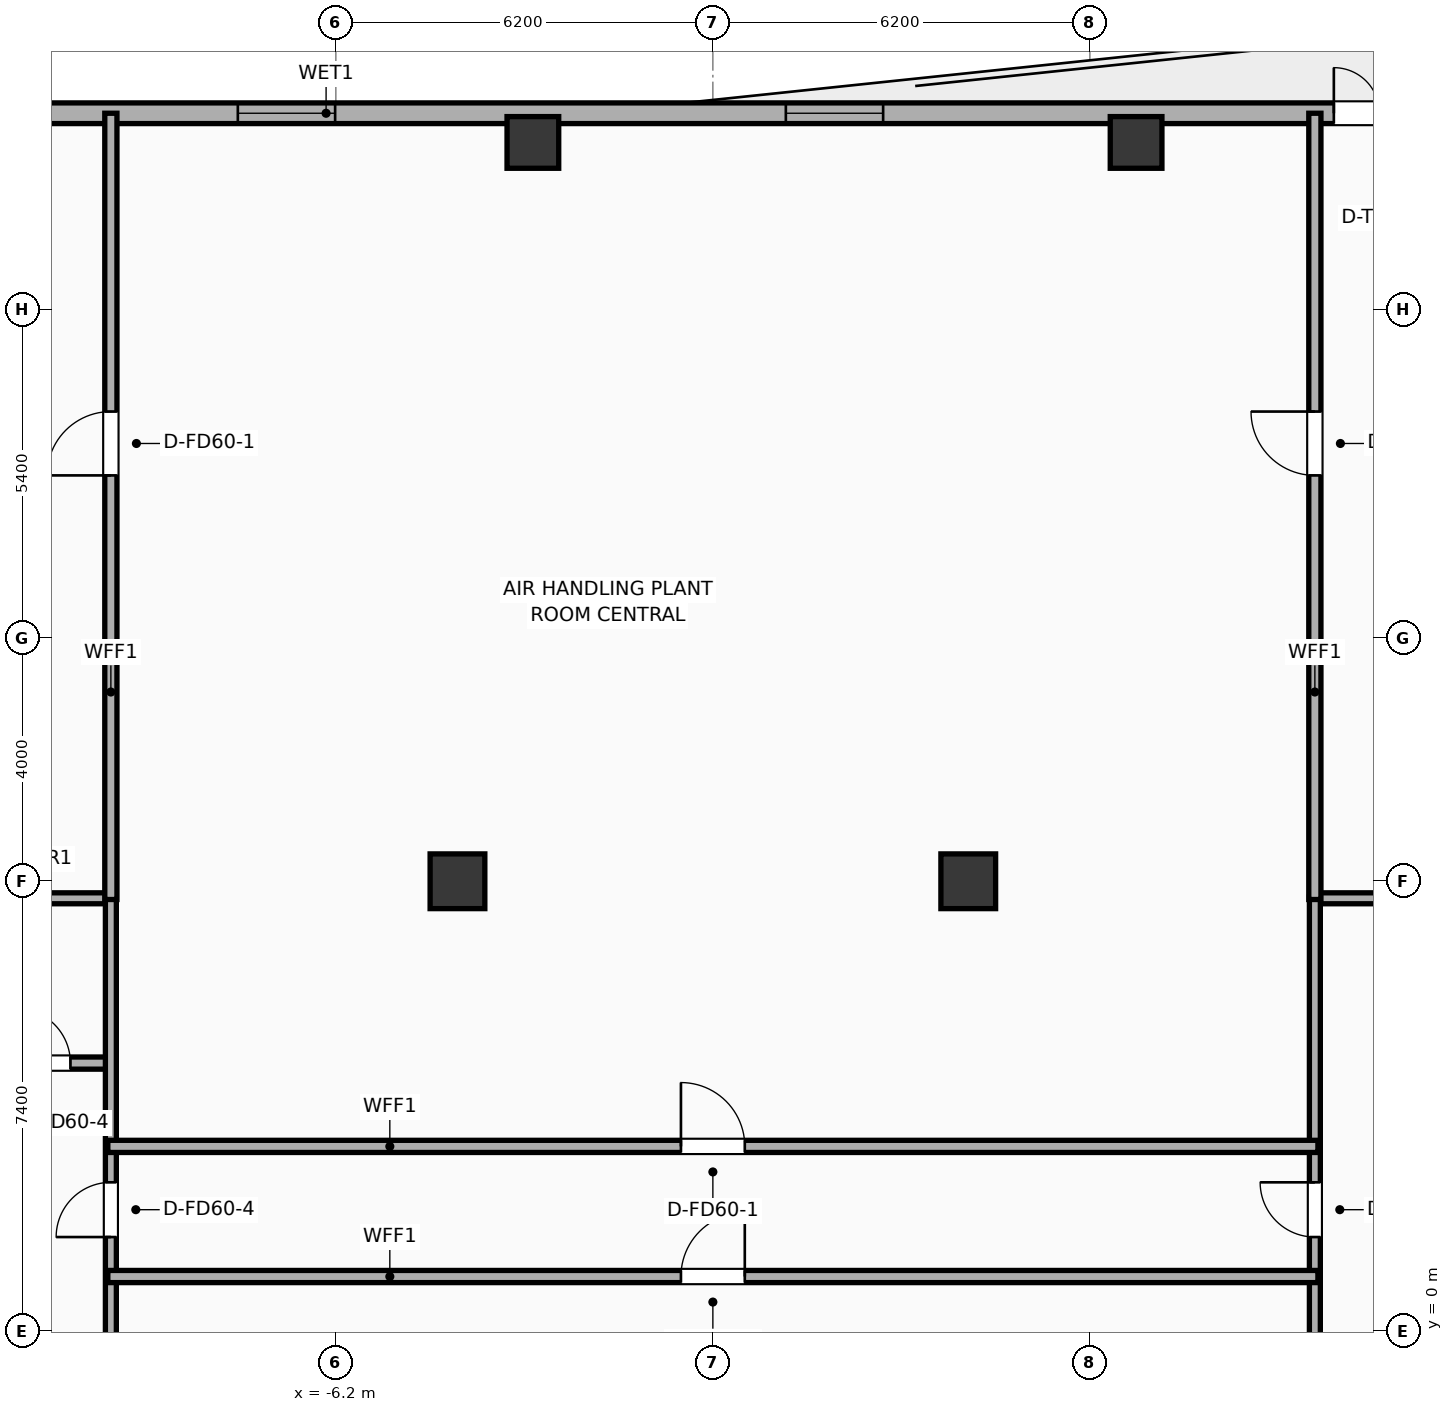
"""IFC4 building model, lengths in metres.
Left out: names, types, materials, properties, quantities, classifications, styles, units other than length and angle.
Written with IfcOpenShell. Run it as: python <this file> out.ifc"""

import sys

from ifc_helpers import new_model, si_unit, direction, frame, frame_2d, origin, origin_2d, place, context, subcontext, project, spatial, rectangle, hollow_rectangle, extrude, element, fill, save


model = new_model("IFC4")
c1 = context("Model", 3, precision=1e-05, world=origin(), true_north=direction((0.0, 1.0)))
c2 = subcontext(c1, "Body", "Model", "MODEL_VIEW")
j1 = project(units=[si_unit("LENGTHUNIT", "METRE"), si_unit("PLANEANGLEUNIT", "RADIAN")], contexts=[c1])
p1 = place(None, origin())
s1 = spatial("IfcSite", under=j1, at=p1, CompositionType="ELEMENT")
p2 = place(p1, origin())
s2 = spatial("IfcBuilding", under=s1, at=p2, CompositionType="ELEMENT")
p3 = place(p2, frame((0.0, 0.0, 195.0)))
s3 = spatial("IfcBuildingStorey", under=s2, at=p3, CompositionType="ELEMENT", Elevation=195.0)
for number, where, z_axis, x_axis in (
    (1, (-4.2, 7.4, 0.0), (0.0, 0.0, 1.0), (1.0, 0.0, 0.0)),
    (2, (4.2, 7.4, 0.0), (0.0, 0.0, 1.0), (1.0, 0.0, 0.0)),
):
    element("IfcColumn", number, at=place(p3, frame(where, z_axis=z_axis, x_axis=x_axis)), inside=s3, PredefinedType="COLUMN", context=c2, shape_type="SweptSolid", body=[
        extrude(rectangle(XDim=0.9, YDim=0.9, at=origin_2d()), origin(), (0.0, 0.0, 1.0), 5.2),
    ])
for number, where, z_axis, x_axis in (
    (3, (6.96, 19.55, -0.4), (0.0, 0.0, 1.0), (1.0, 0.0, 0.0)),
    (4, (-2.96, 19.55, -0.4), (0.0, 0.0, 1.0), (1.0, 0.0, 0.0)),
):
    element("IfcColumn", number, at=place(p3, frame(where, z_axis=z_axis, x_axis=x_axis)), inside=s3, PredefinedType="COLUMN", context=c2, shape_type="SweptSolid", body=[
        extrude(hollow_rectangle(XDim=0.85, YDim=0.85, WallThickness=0.028, at=origin_2d()), origin(), (0.0, 0.0, 1.0), 5.6),
    ])
p4 = place(p3, frame((-22.783, 20.03, 0.0), z_axis=(0.0, 0.0, 1.0), x_axis=(1.0, 0.0, 0.0)))
e5 = element("IfcWall", 5, at=p4, inside=s3, PredefinedType="ELEMENTEDWALL", context=c2, shape_type="SweptSolid", body=[
    extrude(rectangle(XDim=49.566, YDim=0.34, at=frame_2d((24.783, 0.0))), origin(), (0.0, 0.0, 1.0), 3.69),
])
p5 = place(p4, frame((1.453, 0.0, 0.75)))
e6 = element("IfcOpeningElement", 6, at=p5, cuts=e5, PredefinedType="OPENING", context=c2, shape_type="SweptSolid", body=[
    extrude(rectangle(XDim=1.6, YDim=1.4, at=frame_2d((0.8, 0.7))), frame((0.0, 0.18, 0.0), z_axis=(0.0, -1.0, 0.0), x_axis=(1.0, 0.0, 0.0)), (0.0, 0.0, 1.0), 0.36),
])
p6 = place(p4, frame((5.959, 0.0, 0.75)))
e7 = element("IfcOpeningElement", 7, at=p6, cuts=e5, PredefinedType="OPENING", context=c2, shape_type="SweptSolid", body=[
    extrude(rectangle(XDim=1.6, YDim=1.4, at=frame_2d((0.8, 0.7))), frame((0.0, 0.18, 0.0), z_axis=(0.0, -1.0, 0.0), x_axis=(1.0, 0.0, 0.0)), (0.0, 0.0, 1.0), 0.36),
])
p7 = place(p4, frame((14.971, 0.0, 0.75)))
e8 = element("IfcOpeningElement", 8, at=p7, cuts=e5, PredefinedType="OPENING", context=c2, shape_type="SweptSolid", body=[
    extrude(rectangle(XDim=1.6, YDim=1.4, at=frame_2d((0.8, 0.7))), frame((0.0, 0.18, 0.0), z_axis=(0.0, -1.0, 0.0), x_axis=(1.0, 0.0, 0.0)), (0.0, 0.0, 1.0), 0.36),
])
p8 = place(p4, frame((23.983, 0.0, 0.75)))
e9 = element("IfcOpeningElement", 9, at=p8, cuts=e5, PredefinedType="OPENING", context=c2, shape_type="SweptSolid", body=[
    extrude(rectangle(XDim=1.6, YDim=1.4, at=frame_2d((0.8, 0.7))), frame((0.0, 0.18, 0.0), z_axis=(0.0, -1.0, 0.0), x_axis=(1.0, 0.0, 0.0)), (0.0, 0.0, 1.0), 0.36),
])
p9 = place(p4, frame((32.995, 0.0, 0.0)))
e10 = element("IfcOpeningElement", 10, at=p9, cuts=e5, PredefinedType="OPENING", context=c2, shape_type="SweptSolid", body=[
    extrude(rectangle(XDim=1.5, YDim=2.05, at=frame_2d((0.75, 1.025))), frame((0.0, 0.18, 0.0), z_axis=(0.0, -1.0, 0.0), x_axis=(1.0, 0.0, 0.0)), (0.0, 0.0, 1.0), 0.36),
])
p10 = place(p4, frame((42.008, 0.0, 0.75)))
e11 = element("IfcOpeningElement", 11, at=p10, cuts=e5, PredefinedType="OPENING", context=c2, shape_type="SweptSolid", body=[
    extrude(rectangle(XDim=1.6, YDim=1.4, at=frame_2d((0.8, 0.7))), frame((0.0, 0.18, 0.0), z_axis=(0.0, -1.0, 0.0), x_axis=(1.0, 0.0, 0.0)), (0.0, 0.0, 1.0), 0.36),
])
p11 = place(p4, frame((46.514, 0.0, 0.75)))
e12 = element("IfcOpeningElement", 12, at=p11, cuts=e5, PredefinedType="OPENING", context=c2, shape_type="SweptSolid", body=[
    extrude(rectangle(XDim=1.6, YDim=1.4, at=frame_2d((0.8, 0.7))), frame((0.0, 0.18, 0.0), z_axis=(0.0, -1.0, 0.0), x_axis=(1.0, 0.0, 0.0)), (0.0, 0.0, 1.0), 0.36),
])
p12 = place(p3, frame((-12.15, 4.41, 0.0), z_axis=(0.0, 0.0, 1.0), x_axis=(1.0, 0.0, 0.0)))
e13 = element("IfcWall", 13, at=p12, inside=s3, PredefinedType="PARTITIONING", context=c2, shape_type="SweptSolid", body=[
    extrude(rectangle(XDim=2.27, YDim=0.2, at=frame_2d((1.135, 0.0))), origin(), (0.0, 0.0, 1.0), 4.8),
])
p13 = place(p12, frame((0.685, 0.0, 0.0)))
e14 = element("IfcOpeningElement", 14, at=p13, cuts=e13, PredefinedType="OPENING", context=c2, shape_type="SweptSolid", body=[
    extrude(rectangle(XDim=0.9, YDim=2.05, at=frame_2d((0.45, 1.025))), frame((0.0, 0.11, 0.0), z_axis=(0.0, -1.0, 0.0), x_axis=(1.0, 0.0, 0.0)), (0.0, 0.0, 1.0), 0.22),
])
for number, where, z_axis, x_axis in (
    (15, (-12.15, 7.12, 0.0), (0.0, 0.0, 1.0), (1.0, 0.0, 0.0)),
    (16, (9.88, 7.12, 0.0), (0.0, 0.0, 1.0), (1.0, 0.0, 0.0)),
):
    element("IfcWall", number, at=place(p3, frame(where, z_axis=z_axis, x_axis=x_axis)), inside=s3, PredefinedType="PARTITIONING", context=c2, shape_type="SweptSolid", body=[
        extrude(rectangle(XDim=2.27, YDim=0.18, at=frame_2d((1.135, 0.0))), origin(), (0.0, 0.0, 1.0), 3.84),
    ])
p14 = place(p3, frame((-9.9, -7.14, 0.0), z_axis=(0.0, 0.0, 1.0), x_axis=(0.0, 1.0, 0.0)))
e17 = element("IfcWall", 17, at=p14, inside=s3, PredefinedType="PARTITIONING", context=c2, shape_type="SweptSolid", body=[
    extrude(rectangle(XDim=14.28, YDim=0.18, at=frame_2d((7.14, 0.0))), origin(), (0.0, 0.0, 1.0), 4.8),
])
p15 = place(p14, frame((8.689, 0.0, 0.0)))
e18 = element("IfcOpeningElement", 18, at=p15, cuts=e17, PredefinedType="OPENING", context=c2, shape_type="SweptSolid", body=[
    extrude(rectangle(XDim=0.9, YDim=2.05, at=frame_2d((0.45, 1.025))), frame((0.0, 0.1, 0.0), z_axis=(0.0, -1.0, 0.0), x_axis=(1.0, 0.0, 0.0)), (0.0, 0.0, 1.0), 0.2),
])
p16 = place(p3, frame((9.9, -7.14, 0.0), z_axis=(0.0, 0.0, 1.0), x_axis=(0.0, 1.0, 0.0)))
e19 = element("IfcWall", 19, at=p16, inside=s3, PredefinedType="PARTITIONING", context=c2, shape_type="SweptSolid", body=[
    extrude(rectangle(XDim=14.28, YDim=0.18, at=frame_2d((7.14, 0.0))), origin(), (0.0, 0.0, 1.0), 4.8),
])
p17 = place(p16, frame((8.689, 0.0, 0.0)))
e20 = element("IfcOpeningElement", 20, at=p17, cuts=e19, PredefinedType="OPENING", context=c2, shape_type="SweptSolid", body=[
    extrude(rectangle(XDim=0.9, YDim=2.05, at=frame_2d((0.45, 1.025))), frame((0.0, 0.1, 0.0), z_axis=(0.0, -1.0, 0.0), x_axis=(1.0, 0.0, 0.0)), (0.0, 0.0, 1.0), 0.2),
])
p18 = place(p3, frame((-9.95, 3.04, 0.0), z_axis=(0.0, 0.0, 1.0), x_axis=(1.0, 0.0, 0.0)))
e21 = element("IfcWall", 21, at=p18, inside=s3, PredefinedType="PARTITIONING", context=c2, shape_type="SweptSolid", body=[
    extrude(rectangle(XDim=19.9, YDim=0.2, at=frame_2d((9.95, 0.0))), origin(), (0.0, 0.0, 1.0), 4.8),
])
p19 = place(p18, frame((9.425, 0.0, 0.0)))
e22 = element("IfcOpeningElement", 22, at=p19, cuts=e21, PredefinedType="OPENING", context=c2, shape_type="SweptSolid", body=[
    extrude(rectangle(XDim=1.05, YDim=2.05, at=frame_2d((0.525, 1.025))), frame((0.0, 0.11, 0.0), z_axis=(0.0, -1.0, 0.0), x_axis=(1.0, 0.0, 0.0)), (0.0, 0.0, 1.0), 0.22),
])
p20 = place(p3, frame((-9.95, 0.9, 0.0), z_axis=(0.0, 0.0, 1.0), x_axis=(1.0, 0.0, 0.0)))
e23 = element("IfcWall", 23, at=p20, inside=s3, PredefinedType="PARTITIONING", context=c2, shape_type="SweptSolid", body=[
    extrude(rectangle(XDim=19.9, YDim=0.2, at=frame_2d((9.95, 0.0))), origin(), (0.0, 0.0, 1.0), 4.8),
])
p21 = place(p20, frame((9.425, 0.0, 0.0)))
e24 = element("IfcOpeningElement", 24, at=p21, cuts=e23, PredefinedType="OPENING", context=c2, shape_type="SweptSolid", body=[
    extrude(rectangle(XDim=1.05, YDim=2.05, at=frame_2d((0.525, 1.025))), frame((0.0, 0.11, 0.0), z_axis=(0.0, -1.0, 0.0), x_axis=(1.0, 0.0, 0.0)), (0.0, 0.0, 1.0), 0.22),
])
p22 = place(p3, frame((-9.9, 7.1, 0.0), z_axis=(0.0, 0.0, 1.0), x_axis=(0.0, 1.0, 0.0)))
e25 = element("IfcWall", 25, at=p22, inside=s3, PredefinedType="PARTITIONING", context=c2, shape_type="SweptSolid", body=[
    extrude(rectangle(XDim=12.93, YDim=0.2, at=frame_2d((6.465, 0.0))), origin(), (0.0, 0.0, 1.0), 4.8),
])
p23 = place(p22, frame((6.974, 0.0, 0.0)))
e26 = element("IfcOpeningElement", 26, at=p23, cuts=e25, PredefinedType="OPENING", context=c2, shape_type="SweptSolid", body=[
    extrude(rectangle(XDim=1.05, YDim=2.05, at=frame_2d((0.525, 1.025))), frame((0.0, 0.11, 0.0), z_axis=(0.0, -1.0, 0.0), x_axis=(1.0, 0.0, 0.0)), (0.0, 0.0, 1.0), 0.22),
])
p24 = place(p3, frame((9.9, 7.1, 0.0), z_axis=(0.0, 0.0, 1.0), x_axis=(0.0, 1.0, 0.0)))
e27 = element("IfcWall", 27, at=p24, inside=s3, PredefinedType="PARTITIONING", context=c2, shape_type="SweptSolid", body=[
    extrude(rectangle(XDim=12.93, YDim=0.2, at=frame_2d((6.465, 0.0))), origin(), (0.0, 0.0, 1.0), 4.8),
])
p25 = place(p24, frame((6.974, 0.0, 0.0)))
e28 = element("IfcOpeningElement", 28, at=p25, cuts=e27, PredefinedType="OPENING", context=c2, shape_type="SweptSolid", body=[
    extrude(rectangle(XDim=1.05, YDim=2.05, at=frame_2d((0.525, 1.025))), frame((0.0, 0.11, 0.0), z_axis=(0.0, -1.0, 0.0), x_axis=(1.0, 0.0, 0.0)), (0.0, 0.0, 1.0), 0.22),
])
p26 = place(p7, origin())
e29 = element("IfcWindow", 29, at=p26, inside=s3, PartitioningType="SINGLE_PANEL", PredefinedType="WINDOW", context=c2, shape_type="SweptSolid", body=[
    extrude(rectangle(XDim=1.6, YDim=1.4, at=frame_2d((0.8, 0.7))), frame((0.0, 0.03, 0.0), z_axis=(0.0, -1.0, 0.0), x_axis=(1.0, 0.0, 0.0)), (0.0, 0.0, 1.0), 0.06),
])
fill(e8, e29)
p27 = place(p8, origin())
e30 = element("IfcWindow", 30, at=p27, inside=s3, PartitioningType="SINGLE_PANEL", PredefinedType="WINDOW", context=c2, shape_type="SweptSolid", body=[
    extrude(rectangle(XDim=1.6, YDim=1.4, at=frame_2d((0.8, 0.7))), frame((0.0, 0.03, 0.0), z_axis=(0.0, -1.0, 0.0), x_axis=(1.0, 0.0, 0.0)), (0.0, 0.0, 1.0), 0.06),
])
fill(e9, e30)
p28 = place(p9, origin())
e31 = element("IfcDoor", 31, at=p28, inside=s3, OperationType="DOUBLE_DOOR_SINGLE_SWING", PredefinedType="DOOR", context=c2, shape_type="SweptSolid", body=[
    extrude(rectangle(XDim=1.5, YDim=2.05, at=frame_2d((0.75, 1.025))), frame((0.0, 0.025, 0.0), z_axis=(0.0, -1.0, 0.0), x_axis=(1.0, 0.0, 0.0)), (0.0, 0.0, 1.0), 0.05),
])
fill(e10, e31)
p29 = place(p13, origin())
e32 = element("IfcDoor", 32, at=p29, inside=s3, OperationType="SINGLE_SWING_LEFT", PredefinedType="DOOR", context=c2, shape_type="SweptSolid", body=[
    extrude(rectangle(XDim=0.9, YDim=2.05, at=frame_2d((0.45, 1.025))), frame((0.0, 0.025, 0.0), z_axis=(0.0, -1.0, 0.0), x_axis=(1.0, 0.0, 0.0)), (0.0, 0.0, 1.0), 0.05),
])
fill(e14, e32)
p30 = place(p15, origin())
e33 = element("IfcDoor", 33, at=p30, inside=s3, OperationType="SINGLE_SWING_LEFT", PredefinedType="DOOR", context=c2, shape_type="SweptSolid", body=[
    extrude(rectangle(XDim=0.9, YDim=2.05, at=frame_2d((0.45, 1.025))), frame((0.0, 0.025, 0.0), z_axis=(0.0, -1.0, 0.0), x_axis=(1.0, 0.0, 0.0)), (0.0, 0.0, 1.0), 0.05),
])
fill(e18, e33)
p31 = place(p17, origin())
e34 = element("IfcDoor", 34, at=p31, inside=s3, OperationType="SINGLE_SWING_RIGHT", PredefinedType="DOOR", context=c2, shape_type="SweptSolid", body=[
    extrude(rectangle(XDim=0.9, YDim=2.05, at=frame_2d((0.45, 1.025))), frame((0.0, 0.025, 0.0), z_axis=(0.0, -1.0, 0.0), x_axis=(1.0, 0.0, 0.0)), (0.0, 0.0, 1.0), 0.05),
])
fill(e20, e34)
p32 = place(p19, origin())
e35 = element("IfcDoor", 35, at=p32, inside=s3, OperationType="SINGLE_SWING_LEFT", PredefinedType="DOOR", context=c2, shape_type="SweptSolid", body=[
    extrude(rectangle(XDim=1.05, YDim=2.05, at=frame_2d((0.525, 1.025))), frame((0.0, 0.025, 0.0), z_axis=(0.0, -1.0, 0.0), x_axis=(1.0, 0.0, 0.0)), (0.0, 0.0, 1.0), 0.05),
])
fill(e22, e35)
p33 = place(p21, origin())
e36 = element("IfcDoor", 36, at=p33, inside=s3, OperationType="SINGLE_SWING_RIGHT", PredefinedType="DOOR", context=c2, shape_type="SweptSolid", body=[
    extrude(rectangle(XDim=1.05, YDim=2.05, at=frame_2d((0.525, 1.025))), frame((0.0, 0.025, 0.0), z_axis=(0.0, -1.0, 0.0), x_axis=(1.0, 0.0, 0.0)), (0.0, 0.0, 1.0), 0.05),
])
fill(e24, e36)
p34 = place(p23, origin())
e37 = element("IfcDoor", 37, at=p34, inside=s3, OperationType="SINGLE_SWING_LEFT", PredefinedType="DOOR", context=c2, shape_type="SweptSolid", body=[
    extrude(rectangle(XDim=1.05, YDim=2.05, at=frame_2d((0.525, 1.025))), frame((0.0, 0.025, 0.0), z_axis=(0.0, -1.0, 0.0), x_axis=(1.0, 0.0, 0.0)), (0.0, 0.0, 1.0), 0.05),
])
fill(e26, e37)
p35 = place(p25, origin())
e38 = element("IfcDoor", 38, at=p35, inside=s3, OperationType="SINGLE_SWING_RIGHT", PredefinedType="DOOR", context=c2, shape_type="SweptSolid", body=[
    extrude(rectangle(XDim=1.05, YDim=2.05, at=frame_2d((0.525, 1.025))), frame((0.0, 0.025, 0.0), z_axis=(0.0, -1.0, 0.0), x_axis=(1.0, 0.0, 0.0)), (0.0, 0.0, 1.0), 0.05),
])
fill(e28, e38)
save(model, sys.argv[1])
